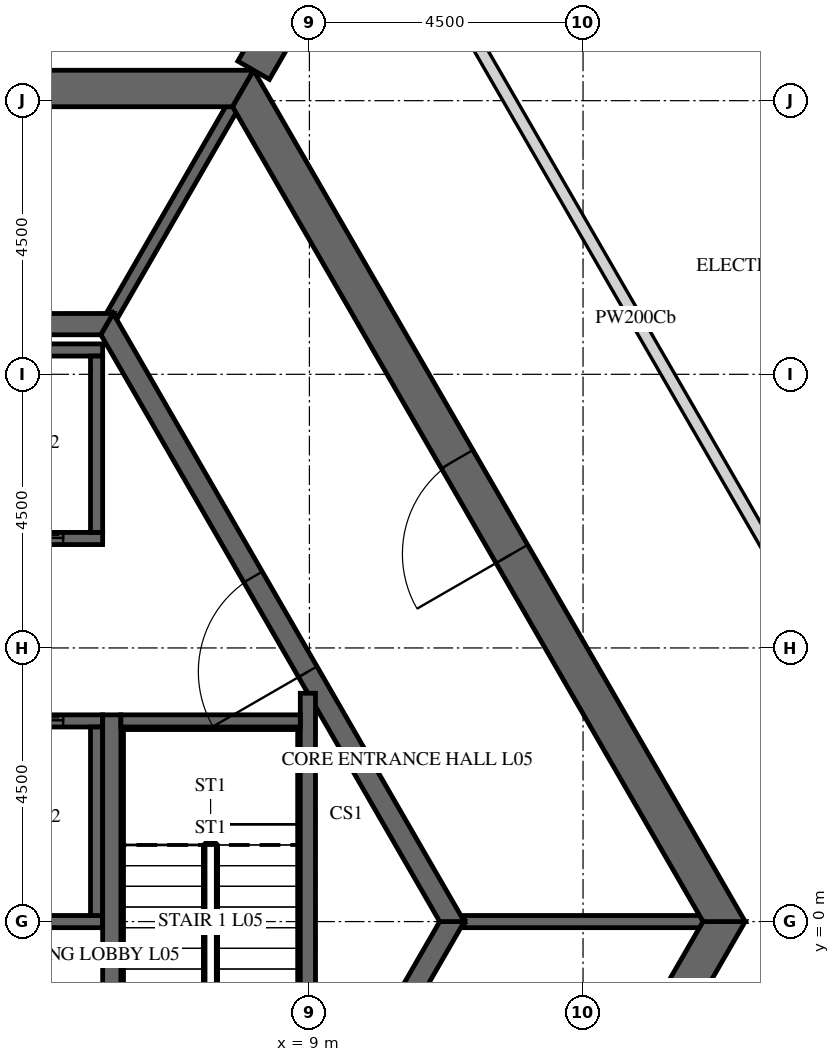
"""IFC4 building model, lengths in metres.
Left out: names, types, materials, properties, quantities, classifications, styles, units other than length and angle.
Written with IfcOpenShell. Run it as: python <this file> out.ifc"""

import sys

from ifc_helpers import new_model, si_unit, direction, frame, frame_2d, origin, place, context, subcontext, project, spatial, polyline, rectangle, outline, extrude, element, fill, save


model = new_model("IFC4")
c1 = context("Model", 3, precision=1e-05, world=origin(), true_north=direction((0.0, 1.0)))
c2 = subcontext(c1, "Body", "Model", "MODEL_VIEW")
j1 = project(units=[si_unit("LENGTHUNIT", "METRE"), si_unit("PLANEANGLEUNIT", "RADIAN")], contexts=[c1])
p1 = place(None, origin())
s1 = spatial("IfcSite", under=j1, at=p1, CompositionType="ELEMENT")
p2 = place(p1, origin())
s2 = spatial("IfcBuilding", under=s1, at=p2, CompositionType="ELEMENT")
p3 = place(p2, frame((0.0, 0.0, 31.5)))
s3 = spatial("IfcBuildingStorey", under=s2, at=p3, CompositionType="ELEMENT", Elevation=31.5)
p4 = place(p3, frame((7.91, -13.7, -0.3), z_axis=(0.0, 0.0, 1.0), x_axis=(0.499999880136, 0.866025472988, 0.0)))
e1 = element("IfcWall", 1, at=p4, inside=s3, PredefinedType="SHEAR", context=c2, shape_type="SweptSolid", body=[
    extrude(outline(polyline([(-0.173, -0.3), (15.993, -0.3), (15.646, 0.3), (0.173, 0.3), (-0.173, -0.3)])), origin(), (0.0, 0.0, 1.0), 6.15),
])
p5 = place(p4, frame((7.039, 0.0, 0.3)))
e2 = element("IfcOpeningElement", 2, at=p5, cuts=e1, PredefinedType="OPENING", context=c2, shape_type="SweptSolid", body=[
    extrude(rectangle(XDim=1.8, YDim=2.4, at=frame_2d((0.9, 1.2))), frame((0.0, 0.31, 0.0), z_axis=(0.0, -1.0, 0.0), x_axis=(1.0, 0.0, 0.0)), (0.0, 0.0, 1.0), 0.62),
])
p6 = place(p3, frame((15.819, 0.0, -0.3), z_axis=(0.0, 0.0, 1.0), x_axis=(-0.499999880136, 0.866025472988, 0.0)))
e3 = element("IfcWall", 3, at=p6, inside=s3, PredefinedType="SHEAR", context=c2, shape_type="SweptSolid", body=[
    extrude(outline(polyline([(-0.173, -0.3), (15.993, -0.3), (15.646, 0.3), (0.173, 0.3), (-0.173, -0.3)])), origin(), (0.0, 0.0, 1.0), 6.15),
])
p7 = place(p6, frame((6.981, 0.0, 0.3)))
e4 = element("IfcOpeningElement", 4, at=p7, cuts=e3, PredefinedType="OPENING", context=c2, shape_type="SweptSolid", body=[
    extrude(rectangle(XDim=1.8, YDim=2.4, at=frame_2d((0.9, 1.2))), frame((0.0, 0.31, 0.0), z_axis=(0.0, -1.0, 0.0), x_axis=(1.0, 0.0, 0.0)), (0.0, 0.0, 1.0), 0.62),
])
p8 = place(p3, frame((7.91, 13.7, -0.3), z_axis=(0.0, 0.0, 1.0), x_axis=(-1.0, 0.0, 0.0)))
e5 = element("IfcWall", 5, at=p8, inside=s3, PredefinedType="SHEAR", context=c2, shape_type="SweptSolid", body=[
    extrude(outline(polyline([(-0.173, -0.3), (15.993, -0.3), (15.646, 0.3), (0.173, 0.3), (-0.173, -0.3)])), origin(), (0.0, 0.0, 1.0), 6.15),
])
p9 = place(p8, frame((7.31, 0.0, 0.3)))
e6 = element("IfcOpeningElement", 6, at=p9, cuts=e5, PredefinedType="OPENING", context=c2, shape_type="SweptSolid", body=[
    extrude(rectangle(XDim=1.2, YDim=2.4, at=frame_2d((0.6, 1.2))), frame((0.0, 0.31, 0.0), z_axis=(0.0, -1.0, 0.0), x_axis=(1.0, 0.0, 0.0)), (0.0, 0.0, 1.0), 0.62),
])
p10 = place(p3, frame((8.083, 14.0, -0.3), z_axis=(0.0, 0.0, 1.0), x_axis=(0.499997680643, 0.866026742862, 0.0)))
e7 = element("IfcWall", 7, at=p10, inside=s3, PredefinedType="SHEAR", context=c2, shape_type="SweptSolid", body=[
    extrude(rectangle(XDim=16.509, YDim=0.6, at=frame_2d((8.254, 0.0))), origin(), (0.0, 0.0, 1.0), 6.15),
])
p11 = place(p10, frame((7.354, 0.0, 0.3)))
e8 = element("IfcOpeningElement", 8, at=p11, cuts=e7, PredefinedType="OPENING", context=c2, shape_type="SweptSolid", body=[
    extrude(rectangle(XDim=1.8, YDim=2.4, at=frame_2d((0.9, 1.2))), frame((0.0, 0.31, 0.0), z_axis=(0.0, -1.0, 0.0), x_axis=(1.0, 0.0, 0.0)), (0.0, 0.0, 1.0), 0.62),
])
p12 = place(p3, frame((5.673, -9.825, -0.3), z_axis=(0.0, 0.0, 1.0), x_axis=(0.499995046907, 0.866028263435, 0.0)))
e9 = element("IfcWall", 9, at=p12, inside=s3, PredefinedType="SHEAR", context=c2, shape_type="SweptSolid", body=[
    extrude(outline(polyline([(-0.101, -0.175), (11.446, -0.175), (11.244, 0.175), (0.101, 0.175), (-0.101, -0.175)])), origin(), (0.0, 0.0, 1.0), 6.15),
])
p13 = place(p12, frame((4.801, 0.0, 0.3)))
e10 = element("IfcOpeningElement", 10, at=p13, cuts=e9, PredefinedType="OPENING", context=c2, shape_type="SweptSolid", body=[
    extrude(rectangle(XDim=1.8, YDim=2.4, at=frame_2d((0.9, 1.2))), frame((0.0, 0.185, 0.0), z_axis=(0.0, -1.0, 0.0), x_axis=(1.0, 0.0, 0.0)), (0.0, 0.0, 1.0), 0.37),
])
p14 = place(p3, frame((11.345, 0.0, -0.3), z_axis=(0.0, 0.0, 1.0), x_axis=(-0.499995046907, 0.866028263435, 0.0)))
e11 = element("IfcWall", 11, at=p14, inside=s3, PredefinedType="SHEAR", context=c2, shape_type="SweptSolid", body=[
    extrude(outline(polyline([(-0.101, -0.175), (11.446, -0.175), (11.244, 0.175), (0.101, 0.175), (-0.101, -0.175)])), origin(), (0.0, 0.0, 1.0), 6.15),
])
p15 = place(p14, frame((4.744, 0.0, 0.3)))
e12 = element("IfcOpeningElement", 12, at=p15, cuts=e11, PredefinedType="OPENING", context=c2, shape_type="SweptSolid", body=[
    extrude(rectangle(XDim=1.8, YDim=2.4, at=frame_2d((0.9, 1.2))), frame((0.0, 0.185, 0.0), z_axis=(0.0, -1.0, 0.0), x_axis=(1.0, 0.0, 0.0)), (0.0, 0.0, 1.0), 0.37),
])
p16 = place(p3, frame((5.673, 9.825, -0.3), z_axis=(0.0, 0.0, 1.0), x_axis=(-1.0, 0.0, 0.0)))
e13 = element("IfcWall", 13, at=p16, inside=s3, PredefinedType="SHEAR", context=c2, shape_type="SweptSolid", body=[
    extrude(outline(polyline([(-0.101, -0.175), (11.446, -0.175), (11.244, 0.175), (0.101, 0.175), (-0.101, -0.175)])), origin(), (0.0, 0.0, 1.0), 6.15),
])
p17 = place(p3, frame((-5.6, 6.3, -0.25), z_axis=(0.0, 0.0, 1.0), x_axis=(1.0, 0.0, 0.0)))
e14 = element("IfcWall", 14, at=p17, inside=s3, PredefinedType="SHEAR", context=c2, shape_type="SweptSolid", body=[
    extrude(rectangle(XDim=11.2, YDim=0.2, at=frame_2d((5.6, 0.0))), origin(), (0.0, 0.0, 1.0), 6.0),
])
p18 = place(p17, frame((0.65, 0.0, 0.25)))
e15 = element("IfcOpeningElement", 15, at=p18, cuts=e14, PredefinedType="OPENING", context=c2, shape_type="SweptSolid", body=[
    extrude(rectangle(XDim=1.1, YDim=2.1, at=frame_2d((0.55, 1.05))), frame((0.0, 0.11, 0.0), z_axis=(0.0, -1.0, 0.0), x_axis=(1.0, 0.0, 0.0)), (0.0, 0.0, 1.0), 0.22),
])
p19 = place(p17, frame((2.85, 0.0, 0.25)))
e16 = element("IfcOpeningElement", 16, at=p19, cuts=e14, PredefinedType="OPENING", context=c2, shape_type="SweptSolid", body=[
    extrude(rectangle(XDim=1.1, YDim=2.1, at=frame_2d((0.55, 1.05))), frame((0.0, 0.11, 0.0), z_axis=(0.0, -1.0, 0.0), x_axis=(1.0, 0.0, 0.0)), (0.0, 0.0, 1.0), 0.22),
])
p20 = place(p17, frame((5.05, 0.0, 0.25)))
e17 = element("IfcOpeningElement", 17, at=p20, cuts=e14, PredefinedType="OPENING", context=c2, shape_type="SweptSolid", body=[
    extrude(rectangle(XDim=1.1, YDim=2.1, at=frame_2d((0.55, 1.05))), frame((0.0, 0.11, 0.0), z_axis=(0.0, -1.0, 0.0), x_axis=(1.0, 0.0, 0.0)), (0.0, 0.0, 1.0), 0.22),
])
p21 = place(p17, frame((7.25, 0.0, 0.25)))
e18 = element("IfcOpeningElement", 18, at=p21, cuts=e14, PredefinedType="OPENING", context=c2, shape_type="SweptSolid", body=[
    extrude(rectangle(XDim=1.1, YDim=2.1, at=frame_2d((0.55, 1.05))), frame((0.0, 0.11, 0.0), z_axis=(0.0, -1.0, 0.0), x_axis=(1.0, 0.0, 0.0)), (0.0, 0.0, 1.0), 0.22),
])
p22 = place(p17, frame((9.45, 0.0, 0.25)))
e19 = element("IfcOpeningElement", 19, at=p22, cuts=e14, PredefinedType="OPENING", context=c2, shape_type="SweptSolid", body=[
    extrude(rectangle(XDim=1.1, YDim=2.1, at=frame_2d((0.55, 1.05))), frame((0.0, 0.11, 0.0), z_axis=(0.0, -1.0, 0.0), x_axis=(1.0, 0.0, 0.0)), (0.0, 0.0, 1.0), 0.22),
])
p23 = place(p3, frame((-5.6, 9.4, -0.25), z_axis=(0.0, 0.0, 1.0), x_axis=(1.0, 0.0, 0.0)))
e20 = element("IfcWall", 20, at=p23, inside=s3, PredefinedType="SHEAR", context=c2, shape_type="SweptSolid", body=[
    extrude(rectangle(XDim=11.2, YDim=0.2, at=frame_2d((5.6, 0.0))), origin(), (0.0, 0.0, 1.0), 6.0),
])
p24 = place(p3, frame((5.5, 6.4, -0.25), z_axis=(0.0, 0.0, 1.0), x_axis=(0.0, 1.0, 0.0)))
e21 = element("IfcWall", 21, at=p24, inside=s3, PredefinedType="SHEAR", context=c2, shape_type="SweptSolid", body=[
    extrude(rectangle(XDim=2.9, YDim=0.2, at=frame_2d((1.45, 0.0))), origin(), (0.0, 0.0, 1.0), 6.0),
])
p25 = place(p3, frame((-5.6, 3.3, -0.25), z_axis=(0.0, 0.0, 1.0), x_axis=(1.0, 0.0, 0.0)))
e22 = element("IfcWall", 22, at=p25, inside=s3, PredefinedType="SHEAR", context=c2, shape_type="SweptSolid", body=[
    extrude(rectangle(XDim=11.2, YDim=0.2, at=frame_2d((5.6, 0.0))), origin(), (0.0, 0.0, 1.0), 6.0),
])
p26 = place(p25, frame((0.65, 0.0, 0.25)))
e23 = element("IfcOpeningElement", 23, at=p26, cuts=e22, PredefinedType="OPENING", context=c2, shape_type="SweptSolid", body=[
    extrude(rectangle(XDim=1.1, YDim=2.1, at=frame_2d((0.55, 1.05))), frame((0.0, 0.11, 0.0), z_axis=(0.0, -1.0, 0.0), x_axis=(1.0, 0.0, 0.0)), (0.0, 0.0, 1.0), 0.22),
])
p27 = place(p25, frame((2.85, 0.0, 0.25)))
e24 = element("IfcOpeningElement", 24, at=p27, cuts=e22, PredefinedType="OPENING", context=c2, shape_type="SweptSolid", body=[
    extrude(rectangle(XDim=1.1, YDim=2.1, at=frame_2d((0.55, 1.05))), frame((0.0, 0.11, 0.0), z_axis=(0.0, -1.0, 0.0), x_axis=(1.0, 0.0, 0.0)), (0.0, 0.0, 1.0), 0.22),
])
p28 = place(p25, frame((5.05, 0.0, 0.25)))
e25 = element("IfcOpeningElement", 25, at=p28, cuts=e22, PredefinedType="OPENING", context=c2, shape_type="SweptSolid", body=[
    extrude(rectangle(XDim=1.1, YDim=2.1, at=frame_2d((0.55, 1.05))), frame((0.0, 0.11, 0.0), z_axis=(0.0, -1.0, 0.0), x_axis=(1.0, 0.0, 0.0)), (0.0, 0.0, 1.0), 0.22),
])
p29 = place(p25, frame((7.25, 0.0, 0.25)))
e26 = element("IfcOpeningElement", 26, at=p29, cuts=e22, PredefinedType="OPENING", context=c2, shape_type="SweptSolid", body=[
    extrude(rectangle(XDim=1.1, YDim=2.1, at=frame_2d((0.55, 1.05))), frame((0.0, 0.11, 0.0), z_axis=(0.0, -1.0, 0.0), x_axis=(1.0, 0.0, 0.0)), (0.0, 0.0, 1.0), 0.22),
])
p30 = place(p25, frame((9.45, 0.0, 0.25)))
e27 = element("IfcOpeningElement", 27, at=p30, cuts=e22, PredefinedType="OPENING", context=c2, shape_type="SweptSolid", body=[
    extrude(rectangle(XDim=1.1, YDim=2.1, at=frame_2d((0.55, 1.05))), frame((0.0, 0.11, 0.0), z_axis=(0.0, -1.0, 0.0), x_axis=(1.0, 0.0, 0.0)), (0.0, 0.0, 1.0), 0.22),
])
p31 = place(p3, frame((-5.6, 0.0, -0.25), z_axis=(0.0, 0.0, 1.0), x_axis=(1.0, 0.0, 0.0)))
e28 = element("IfcWall", 28, at=p31, inside=s3, PredefinedType="SHEAR", context=c2, shape_type="SweptSolid", body=[
    extrude(rectangle(XDim=11.2, YDim=0.2, at=frame_2d((5.6, 0.0))), origin(), (0.0, 0.0, 1.0), 6.0),
])
p32 = place(p3, frame((5.5, 0.1, -0.25), z_axis=(0.0, 0.0, 1.0), x_axis=(0.0, 1.0, 0.0)))
e29 = element("IfcWall", 29, at=p32, inside=s3, PredefinedType="SHEAR", context=c2, shape_type="SweptSolid", body=[
    extrude(rectangle(XDim=3.1, YDim=0.2, at=frame_2d((1.55, 0.0))), origin(), (0.0, 0.0, 1.0), 6.0),
])
p33 = place(p3, frame((11.547, 0.0, -0.3), z_axis=(0.0, 0.0, 1.0), x_axis=(1.0, 0.0, 0.0)))
e30 = element("IfcWall", 30, at=p33, inside=s3, PredefinedType="SHEAR", context=c2, shape_type="SweptSolid", body=[
    extrude(rectangle(XDim=3.926, YDim=0.2, at=frame_2d((1.963, 0.0))), origin(), (0.0, 0.0, 1.0), 6.15),
])
p34 = place(p3, frame((5.773, 10.0, -0.3), z_axis=(0.0, 0.0, 1.0), x_axis=(0.500038251005, 0.86600331843, 0.0)))
e31 = element("IfcWall", 31, at=p34, inside=s3, PredefinedType="SHEAR", context=c2, shape_type="SweptSolid", body=[
    extrude(rectangle(XDim=3.926, YDim=0.2, at=frame_2d((1.963, 0.0))), origin(), (0.0, 0.0, 1.0), 6.15),
])
p35 = place(p3, frame((5.75, -3.4, -0.25), z_axis=(0.0, 0.0, 1.0), x_axis=(0.0, 1.0, 0.0)))
e32 = element("IfcWall", 32, at=p35, inside=s3, PredefinedType="SHEAR", context=c2, shape_type="SweptSolid", body=[
    extrude(rectangle(XDim=6.8, YDim=0.3, at=frame_2d((3.4, 0.0))), origin(), (0.0, 0.0, 1.0), 6.0),
])
p36 = place(p3, frame((8.975, -3.755, -0.25), z_axis=(0.0, 0.0, 1.0), x_axis=(0.0, 1.0, 0.0)))
e33 = element("IfcWall", 33, at=p36, inside=s3, PredefinedType="SHEAR", context=c2, shape_type="SweptSolid", body=[
    extrude(rectangle(XDim=7.51, YDim=0.25, at=frame_2d((3.755, 0.0))), origin(), (0.0, 0.0, 1.0), 6.0),
])
p37 = place(p3, frame((5.9, 3.3, -0.25), z_axis=(0.0, 0.0, 1.0), x_axis=(1.0, 0.0, 0.0)))
e34 = element("IfcWall", 34, at=p37, inside=s3, PredefinedType="SHEAR", context=c2, shape_type="SweptSolid", body=[
    extrude(rectangle(XDim=2.95, YDim=0.2, at=frame_2d((1.475, 0.0))), origin(), (0.0, 0.0, 1.0), 6.0),
])
p38 = place(p3, frame((11.624, -14.666, 0.0), z_axis=(0.0, 0.0, 1.0), x_axis=(0.500026107117, 0.866010330309, 0.0)))
e35 = element("IfcWall", 35, at=p38, inside=s3, PredefinedType="PARTITIONING", context=c2, shape_type="SweptSolid", body=[
    extrude(rectangle(XDim=16.935, YDim=0.2, at=frame_2d((8.468, 0.0))), origin(), (0.0, 0.0, 1.0), 5.85),
])
p39 = place(p3, frame((24.493, 3.617, 0.0), z_axis=(0.0, 0.0, 1.0), x_axis=(-0.49998880049, 0.866031869728, 0.0)))
e36 = element("IfcWall", 36, at=p39, inside=s3, PredefinedType="PARTITIONING", context=c2, shape_type="SweptSolid", body=[
    extrude(rectangle(XDim=22.058, YDim=0.2, at=frame_2d((11.029, 0.0))), origin(), (0.0, 0.0, 1.0), 5.85),
])
p40 = place(p39, frame((10.529, 0.0, 0.0)))
e37 = element("IfcOpeningElement", 37, at=p40, cuts=e36, PredefinedType="OPENING", context=c2, shape_type="SweptSolid", body=[
    extrude(rectangle(XDim=1.0, YDim=2.1, at=frame_2d((0.5, 1.05))), frame((0.0, 0.11, 0.0), z_axis=(0.0, -1.0, 0.0), x_axis=(1.0, 0.0, 0.0)), (0.0, 0.0, 1.0), 0.22),
])
p41 = place(p3, frame((18.513, 2.734, 0.0), z_axis=(0.0, 0.0, 1.0), x_axis=(-0.499982347303, 0.866035595334, 0.0)))
e38 = element("IfcWall", 38, at=p41, inside=s3, PredefinedType="PARTITIONING", context=c2, shape_type="SweptSolid", body=[
    extrude(rectangle(XDim=16.588, YDim=0.2, at=frame_2d((8.294, 0.0))), origin(), (0.0, 0.0, 1.0), 5.85),
])
p42 = place(p3, frame((15.08, 25.52, 0.0), z_axis=(0.0, 0.0, 1.0), x_axis=(0.500034818431, -0.866005300421, 0.0)))
e39 = element("IfcWall", 39, at=p42, inside=s3, PredefinedType="PARTITIONING", context=c2, shape_type="SweptSolid", body=[
    extrude(rectangle(XDim=17.275, YDim=0.2, at=frame_2d((8.637, 0.0))), origin(), (0.0, 0.0, 1.0), 5.85),
])
p43 = place(p42, frame((8.137, 0.0, 0.0)))
e40 = element("IfcOpeningElement", 40, at=p43, cuts=e39, PredefinedType="OPENING", context=c2, shape_type="SweptSolid", body=[
    extrude(rectangle(XDim=1.0, YDim=2.1, at=frame_2d((0.5, 1.05))), frame((0.0, 0.11, 0.0), z_axis=(0.0, -1.0, 0.0), x_axis=(1.0, 0.0, 0.0)), (0.0, 0.0, 1.0), 0.22),
])
p44 = place(p3, frame((15.433, -19.31, 0.0), z_axis=(0.0, 0.0, 1.0), x_axis=(0.499986369096, 0.866033273447, 0.0)))
e41 = element("IfcWall", 41, at=p44, inside=s3, PredefinedType="PARTITIONING", context=c2, shape_type="SweptSolid", body=[
    extrude(rectangle(XDim=22.181, YDim=0.2, at=frame_2d((11.091, 0.0))), origin(), (0.0, 0.0, 1.0), 5.85),
])
p45 = place(p44, frame((10.591, 0.0, 0.0)))
e42 = element("IfcOpeningElement", 42, at=p45, cuts=e41, PredefinedType="OPENING", context=c2, shape_type="SweptSolid", body=[
    extrude(rectangle(XDim=1.0, YDim=2.1, at=frame_2d((0.5, 1.05))), frame((0.0, 0.11, 0.0), z_axis=(0.0, -1.0, 0.0), x_axis=(1.0, 0.0, 0.0)), (0.0, 0.0, 1.0), 0.22),
])
p46 = place(p7, origin())
e43 = element("IfcDoor", 43, at=p46, inside=s3, OperationType="DOUBLE_DOOR_SINGLE_SWING", PredefinedType="DOOR", context=c2, shape_type="SweptSolid", body=[
    extrude(rectangle(XDim=1.8, YDim=2.4, at=frame_2d((0.9, 1.2))), frame((0.0, 0.025, 0.0), z_axis=(0.0, -1.0, 0.0), x_axis=(1.0, 0.0, 0.0)), (0.0, 0.0, 1.0), 0.05),
])
fill(e4, e43)
p47 = place(p15, origin())
e44 = element("IfcDoor", 44, at=p47, inside=s3, OperationType="DOUBLE_DOOR_SINGLE_SWING", PredefinedType="DOOR", context=c2, shape_type="SweptSolid", body=[
    extrude(rectangle(XDim=1.8, YDim=2.4, at=frame_2d((0.9, 1.2))), frame((0.0, 0.025, 0.0), z_axis=(0.0, -1.0, 0.0), x_axis=(1.0, 0.0, 0.0)), (0.0, 0.0, 1.0), 0.05),
])
fill(e12, e44)
p48 = place(p22, origin())
e45 = element("IfcDoor", 45, at=p48, inside=s3, OperationType="SLIDING_TO_LEFT", PredefinedType="DOOR", context=c2, shape_type="SweptSolid", body=[
    extrude(rectangle(XDim=1.1, YDim=2.1, at=frame_2d((0.55, 1.05))), frame((0.0, 0.025, 0.0), z_axis=(0.0, -1.0, 0.0), x_axis=(1.0, 0.0, 0.0)), (0.0, 0.0, 1.0), 0.05),
])
fill(e19, e45)
p49 = place(p30, origin())
e46 = element("IfcDoor", 46, at=p49, inside=s3, OperationType="SLIDING_TO_LEFT", PredefinedType="DOOR", context=c2, shape_type="SweptSolid", body=[
    extrude(rectangle(XDim=1.1, YDim=2.1, at=frame_2d((0.55, 1.05))), frame((0.0, 0.025, 0.0), z_axis=(0.0, -1.0, 0.0), x_axis=(1.0, 0.0, 0.0)), (0.0, 0.0, 1.0), 0.05),
])
fill(e27, e46)
save(model, sys.argv[1])
